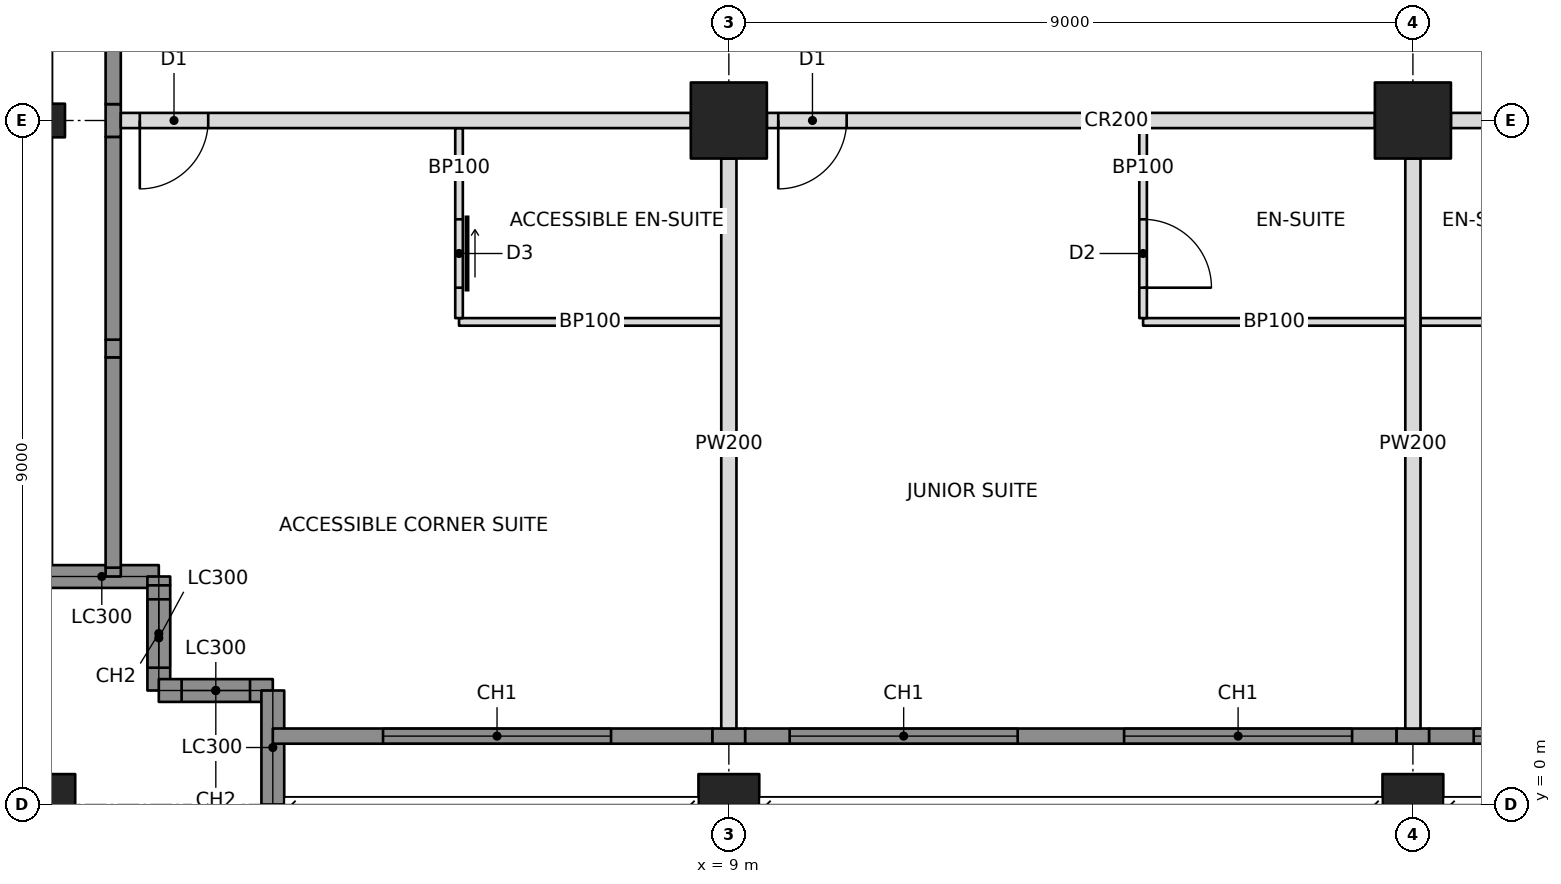
"""IFC4 building model, lengths in metres.
Left out: names, types, materials, properties, quantities, classifications, styles, units other than length and angle.
Written with IfcOpenShell. Run it as: python <this file> out.ifc"""

import sys

from ifc_helpers import new_model, si_unit, direction, frame, frame_2d, origin, origin_with_axes, origin_2d, place, context, subcontext, project, spatial, rectangle, hollow_rectangle, i_section, extrude, element, fill, save


model = new_model("IFC4")
c1 = context("Model", 3, precision=1e-05, world=origin(), true_north=direction((0.0, 1.0)))
c2 = subcontext(c1, "Body", "Model", "MODEL_VIEW")
j1 = project(units=[si_unit("LENGTHUNIT", "METRE"), si_unit("PLANEANGLEUNIT", "RADIAN")], contexts=[c1])
p1 = place(None, origin())
s1 = spatial("IfcSite", under=j1, at=p1, CompositionType="ELEMENT")
p2 = place(p1, origin())
s2 = spatial("IfcBuilding", under=s1, at=p2, CompositionType="ELEMENT")
p3 = place(p2, frame((0.0, 0.0, 152.0)))
s3 = spatial("IfcBuildingStorey", under=s2, at=p3, CompositionType="ELEMENT", Elevation=152.0)
p4 = place(p3, origin_with_axes())
e1 = element("IfcColumn", 1, at=p4, inside=s3, PredefinedType="COLUMN", context=c2, shape_type="SweptSolid", body=[
    extrude(hollow_rectangle(XDim=0.8, YDim=0.8, WallThickness=0.06, at=origin_2d()), origin(), (0.0, 0.0, 1.0), 3.4),
])
p5 = place(p3, frame((0.0, 9.0, 0.0), z_axis=(0.0, 0.0, 1.0), x_axis=(0.0, 1.0, 0.0)))
e2 = element("IfcColumn", 2, at=p5, inside=s3, PredefinedType="COLUMN", context=c2, shape_type="SweptSolid", body=[
    extrude(i_section(OverallWidth=0.442, OverallDepth=0.531, WebThickness=0.066, FlangeThickness=0.106, at=origin_2d()), origin(), (0.0, 0.0, 1.0), 3.4),
])
p6 = place(p3, frame((9.0, 0.0, 0.0), z_axis=(0.0, 0.0, 1.0), x_axis=(1.0, 0.0, 0.0)))
e3 = element("IfcColumn", 3, at=p6, inside=s3, PredefinedType="COLUMN", context=c2, shape_type="SweptSolid", body=[
    extrude(hollow_rectangle(XDim=0.8, YDim=0.8, WallThickness=0.06, at=origin_2d()), origin(), (0.0, 0.0, 1.0), 3.4),
])
p7 = place(p3, frame((9.0, 9.0, 0.0), z_axis=(0.0, 0.0, 1.0), x_axis=(1.0, 0.0, 0.0)))
e4 = element("IfcColumn", 4, at=p7, inside=s3, PredefinedType="COLUMN", context=c2, shape_type="SweptSolid", body=[
    extrude(hollow_rectangle(XDim=1.0, YDim=1.0, WallThickness=0.1, at=origin_2d()), origin(), (0.0, 0.0, 1.0), 3.4),
])
p8 = place(p3, frame((18.0, 0.0, 0.0), z_axis=(0.0, 0.0, 1.0), x_axis=(1.0, 0.0, 0.0)))
e5 = element("IfcColumn", 5, at=p8, inside=s3, PredefinedType="COLUMN", context=c2, shape_type="SweptSolid", body=[
    extrude(hollow_rectangle(XDim=0.8, YDim=0.8, WallThickness=0.06, at=origin_2d()), origin(), (0.0, 0.0, 1.0), 3.4),
])
p9 = place(p3, frame((18.0, 9.0, 0.0), z_axis=(0.0, 0.0, 1.0), x_axis=(1.0, 0.0, 0.0)))
e6 = element("IfcColumn", 6, at=p9, inside=s3, PredefinedType="COLUMN", context=c2, shape_type="SweptSolid", body=[
    extrude(hollow_rectangle(XDim=1.0, YDim=1.0, WallThickness=0.1, at=origin_2d()), origin(), (0.0, 0.0, 1.0), 3.4),
])
p10 = place(p3, frame((0.0, 3.0, 0.0), z_axis=(0.0, 0.0, 1.0), x_axis=(1.0, 0.0, 0.0)))
e7 = element("IfcWall", 7, at=p10, inside=s3, PredefinedType="SOLIDWALL", context=c2, shape_type="SweptSolid", body=[
    extrude(rectangle(XDim=1.5, YDim=0.3, at=frame_2d((0.75, 0.0))), origin(), (0.0, 0.0, 1.0), 2.202),
])
p11 = place(p3, frame((1.5, 3.0, 0.0), z_axis=(0.0, 0.0, 1.0), x_axis=(0.0, -1.0, 0.0)))
e8 = element("IfcWall", 8, at=p11, inside=s3, PredefinedType="SOLIDWALL", context=c2, shape_type="SweptSolid", body=[
    extrude(rectangle(XDim=0.116, YDim=0.3, at=frame_2d((0.058, 0.0))), origin(), (0.0, 0.0, 1.0), 2.542),
])
p12 = place(p3, frame((1.5, 1.5, 0.0), z_axis=(0.0, 0.0, 1.0), x_axis=(1.0, 0.0, 0.0)))
e9 = element("IfcWall", 9, at=p12, inside=s3, PredefinedType="SOLIDWALL", context=c2, shape_type="SweptSolid", body=[
    extrude(rectangle(XDim=1.5, YDim=0.3, at=frame_2d((0.75, 0.0))), origin(), (0.0, 0.0, 1.0), 3.15),
])
p13 = place(p12, frame((0.3, 0.0, 0.6)))
e10 = element("IfcOpeningElement", 10, at=p13, cuts=e9, PredefinedType="OPENING", context=c2, shape_type="SweptSolid", body=[
    extrude(rectangle(XDim=0.9, YDim=2.2, at=frame_2d((0.45, 1.1))), frame((0.0, 0.16, 0.0), z_axis=(0.0, -1.0, 0.0), x_axis=(1.0, 0.0, 0.0)), (0.0, 0.0, 1.0), 0.32),
])
p14 = place(p3, frame((3.0, 1.5, 0.0), z_axis=(0.0, 0.0, 1.0), x_axis=(0.0, -1.0, 0.0)))
e11 = element("IfcWall", 11, at=p14, inside=s3, PredefinedType="SOLIDWALL", context=c2, shape_type="SweptSolid", body=[
    extrude(rectangle(XDim=1.5, YDim=0.3, at=frame_2d((0.75, 0.0))), origin(), (0.0, 0.0, 1.0), 2.202),
])
p15 = place(p3, frame((3.0, 0.9, 0.0), z_axis=(0.0, 0.0, 1.0), x_axis=(1.0, 0.0, 0.0)))
e12 = element("IfcWall", 12, at=p15, inside=s3, PredefinedType="SOLIDWALL", context=c2, shape_type="SweptSolid", body=[
    extrude(rectangle(XDim=5.785, YDim=0.2, at=frame_2d((2.892, 0.0))), origin(), (0.0, 0.0, 1.0), 3.15),
])
p16 = place(p15, frame((1.45, 0.0, 0.6)))
e13 = element("IfcOpeningElement", 13, at=p16, cuts=e12, PredefinedType="OPENING", context=c2, shape_type="SweptSolid", body=[
    extrude(rectangle(XDim=3.0, YDim=2.2, at=frame_2d((1.5, 1.1))), frame((0.0, 0.11, 0.0), z_axis=(0.0, -1.0, 0.0), x_axis=(1.0, 0.0, 0.0)), (0.0, 0.0, 1.0), 0.22),
])
p17 = place(p3, frame((0.9, 3.0, 0.0), z_axis=(0.0, 0.0, 1.0), x_axis=(0.0, 1.0, 0.0)))
e14 = element("IfcWall", 14, at=p17, inside=s3, PredefinedType="SOLIDWALL", context=c2, shape_type="SweptSolid", body=[
    extrude(rectangle(XDim=0.116, YDim=0.2, at=frame_2d((0.058, 0.0))), origin(), (0.0, 0.0, 1.0), 2.542),
])
p18 = place(p3, frame((1.0, 9.0, 0.0), z_axis=(0.0, 0.0, 1.0), x_axis=(1.0, 0.0, 0.0)))
e15 = element("IfcWall", 15, at=p18, inside=s3, PredefinedType="PARTITIONING", context=c2, shape_type="SweptSolid", body=[
    extrude(rectangle(XDim=7.5, YDim=0.2, at=frame_2d((3.75, 0.0))), origin(), (0.0, 0.0, 1.0), 2.21),
])
p19 = place(p18, frame((0.25, 0.0, 0.0)))
e16 = element("IfcOpeningElement", 16, at=p19, cuts=e15, PredefinedType="OPENING", context=c2, shape_type="SweptSolid", body=[
    extrude(rectangle(XDim=0.9, YDim=2.1, at=frame_2d((0.45, 1.05))), frame((0.0, 0.11, 0.0), z_axis=(0.0, -1.0, 0.0), x_axis=(1.0, 0.0, 0.0)), (0.0, 0.0, 1.0), 0.22),
])
p20 = place(p3, frame((9.5, 9.0, 0.0), z_axis=(0.0, 0.0, 1.0), x_axis=(1.0, 0.0, 0.0)))
e17 = element("IfcWall", 17, at=p20, inside=s3, PredefinedType="PARTITIONING", context=c2, shape_type="SweptSolid", body=[
    extrude(rectangle(XDim=8.0, YDim=0.2, at=frame_2d((4.0, 0.0))), origin(), (0.0, 0.0, 1.0), 2.21),
])
p21 = place(p20, frame((0.15, 0.0, 0.0)))
e18 = element("IfcOpeningElement", 18, at=p21, cuts=e17, PredefinedType="OPENING", context=c2, shape_type="SweptSolid", body=[
    extrude(rectangle(XDim=0.9, YDim=2.1, at=frame_2d((0.45, 1.05))), frame((0.0, 0.11, 0.0), z_axis=(0.0, -1.0, 0.0), x_axis=(1.0, 0.0, 0.0)), (0.0, 0.0, 1.0), 0.22),
])
p22 = place(p3, frame((18.5, 9.0, 0.0), z_axis=(0.0, 0.0, 1.0), x_axis=(1.0, 0.0, 0.0)))
e19 = element("IfcWall", 19, at=p22, inside=s3, PredefinedType="PARTITIONING", context=c2, shape_type="SweptSolid", body=[
    extrude(rectangle(XDim=8.0, YDim=0.2, at=frame_2d((4.0, 0.0))), origin(), (0.0, 0.0, 1.0), 2.21),
])
p23 = place(p22, frame((2.85, 0.0, 0.0)))
e20 = element("IfcOpeningElement", 20, at=p23, cuts=e19, PredefinedType="OPENING", context=c2, shape_type="SweptSolid", body=[
    extrude(rectangle(XDim=0.9, YDim=2.1, at=frame_2d((0.45, 1.05))), frame((0.0, 0.11, 0.0), z_axis=(0.0, -1.0, 0.0), x_axis=(1.0, 0.0, 0.0)), (0.0, 0.0, 1.0), 0.22),
])
p24 = place(p22, frame((4.25, 0.0, 0.0)))
e21 = element("IfcOpeningElement", 21, at=p24, cuts=e19, PredefinedType="OPENING", context=c2, shape_type="SweptSolid", body=[
    extrude(rectangle(XDim=0.9, YDim=2.1, at=frame_2d((0.45, 1.05))), frame((0.0, 0.11, 0.0), z_axis=(0.0, -1.0, 0.0), x_axis=(1.0, 0.0, 0.0)), (0.0, 0.0, 1.0), 0.22),
])
p25 = place(p3, frame((9.0, 8.5, 0.0), z_axis=(0.0, 0.0, 1.0), x_axis=(0.0, -1.0, 0.0)))
e22 = element("IfcWall", 22, at=p25, inside=s3, PredefinedType="PARTITIONING", context=c2, shape_type="SweptSolid", body=[
    extrude(rectangle(XDim=7.5, YDim=0.2, at=frame_2d((3.75, 0.0))), origin(), (0.0, 0.0, 1.0), 2.21),
])
p26 = place(p3, frame((18.0, 8.5, 0.0), z_axis=(0.0, 0.0, 1.0), x_axis=(0.0, -1.0, 0.0)))
e23 = element("IfcWall", 23, at=p26, inside=s3, PredefinedType="PARTITIONING", context=c2, shape_type="SweptSolid", body=[
    extrude(rectangle(XDim=7.5, YDim=0.2, at=frame_2d((3.75, 0.0))), origin(), (0.0, 0.0, 1.0), 2.203),
])
p27 = place(p3, frame((5.45, 6.35, 0.0), z_axis=(0.0, 0.0, 1.0), x_axis=(1.0, 0.0, 0.0)))
e24 = element("IfcWall", 24, at=p27, inside=s3, PredefinedType="PARTITIONING", context=c2, shape_type="SweptSolid", body=[
    extrude(rectangle(XDim=3.45, YDim=0.1, at=frame_2d((1.725, 0.0))), origin(), (0.0, 0.0, 1.0), 2.21),
])
p28 = place(p3, frame((5.45, 8.9, 0.0), z_axis=(0.0, 0.0, 1.0), x_axis=(0.0, -1.0, 0.0)))
e25 = element("IfcWall", 25, at=p28, inside=s3, PredefinedType="PARTITIONING", context=c2, shape_type="SweptSolid", body=[
    extrude(rectangle(XDim=2.5, YDim=0.1, at=frame_2d((1.25, 0.0))), origin(), (0.0, 0.0, 1.0), 2.21),
])
p29 = place(p28, frame((1.2, 0.0, 0.0)))
e26 = element("IfcOpeningElement", 26, at=p29, cuts=e25, PredefinedType="OPENING", context=c2, shape_type="SweptSolid", body=[
    extrude(rectangle(XDim=0.9, YDim=2.1, at=frame_2d((0.45, 1.05))), frame((0.0, 0.06, 0.0), z_axis=(0.0, -1.0, 0.0), x_axis=(1.0, 0.0, 0.0)), (0.0, 0.0, 1.0), 0.12),
])
p30 = place(p3, frame((14.45, 6.35, 0.0), z_axis=(0.0, 0.0, 1.0), x_axis=(1.0, 0.0, 0.0)))
e27 = element("IfcWall", 27, at=p30, inside=s3, PredefinedType="PARTITIONING", context=c2, shape_type="SweptSolid", body=[
    extrude(rectangle(XDim=3.45, YDim=0.1, at=frame_2d((1.725, 0.0))), origin(), (0.0, 0.0, 1.0), 2.202),
])
p31 = place(p3, frame((14.45, 8.9, 0.0), z_axis=(0.0, 0.0, 1.0), x_axis=(0.0, -1.0, 0.0)))
e28 = element("IfcWall", 28, at=p31, inside=s3, PredefinedType="PARTITIONING", context=c2, shape_type="SweptSolid", body=[
    extrude(rectangle(XDim=2.5, YDim=0.1, at=frame_2d((1.25, 0.0))), origin(), (0.0, 0.0, 1.0), 2.21),
])
p32 = place(p31, frame((1.2, 0.0, 0.0)))
e29 = element("IfcOpeningElement", 29, at=p32, cuts=e28, PredefinedType="OPENING", context=c2, shape_type="SweptSolid", body=[
    extrude(rectangle(XDim=0.9, YDim=2.1, at=frame_2d((0.45, 1.05))), frame((0.0, 0.06, 0.0), z_axis=(0.0, -1.0, 0.0), x_axis=(1.0, 0.0, 0.0)), (0.0, 0.0, 1.0), 0.12),
])
p33 = place(p3, frame((18.1, 6.35, 0.0), z_axis=(0.0, 0.0, 1.0), x_axis=(1.0, 0.0, 0.0)))
e30 = element("IfcWall", 30, at=p33, inside=s3, PredefinedType="PARTITIONING", context=c2, shape_type="SweptSolid", body=[
    extrude(rectangle(XDim=2.95, YDim=0.1, at=frame_2d((1.475, 0.0))), origin(), (0.0, 0.0, 1.0), 2.202),
])
p34 = place(p3, frame((1.5, 2.884, 0.0), z_axis=(0.0, 0.0, 1.0), x_axis=(0.0, -1.0, 0.0)))
e31 = element("IfcWall", 31, at=p34, inside=s3, PredefinedType="SOLIDWALL", context=c2, shape_type="SweptSolid", body=[
    extrude(rectangle(XDim=1.384, YDim=0.3, at=frame_2d((0.692, 0.0))), origin(), (0.0, 0.0, 1.0), 3.15),
])
p35 = place(p34, frame((0.184, 0.0, 0.6)))
e32 = element("IfcOpeningElement", 32, at=p35, cuts=e31, PredefinedType="OPENING", context=c2, shape_type="SweptSolid", body=[
    extrude(rectangle(XDim=0.9, YDim=2.2, at=frame_2d((0.45, 1.1))), frame((0.0, 0.16, 0.0), z_axis=(0.0, -1.0, 0.0), x_axis=(1.0, 0.0, 0.0)), (0.0, 0.0, 1.0), 0.32),
])
p36 = place(p3, frame((8.785, 0.9, 0.0), z_axis=(0.0, 0.0, 1.0), x_axis=(1.0, 0.0, 0.0)))
e33 = element("IfcWall", 33, at=p36, inside=s3, PredefinedType="SOLIDWALL", context=c2, shape_type="SweptSolid", body=[
    extrude(rectangle(XDim=0.431, YDim=0.2, at=frame_2d((0.215, 0.0))), origin(), (0.0, 0.0, 1.0), 2.21),
])
p37 = place(p3, frame((9.215, 0.9, 0.0), z_axis=(0.0, 0.0, 1.0), x_axis=(1.0, 0.0, 0.0)))
e34 = element("IfcWall", 34, at=p37, inside=s3, PredefinedType="SOLIDWALL", context=c2, shape_type="SweptSolid", body=[
    extrude(rectangle(XDim=8.571, YDim=0.2, at=frame_2d((4.285, 0.0))), origin(), (0.0, 0.0, 1.0), 3.15),
])
p38 = place(p37, frame((0.585, 0.0, 0.6)))
e35 = element("IfcOpeningElement", 35, at=p38, cuts=e34, PredefinedType="OPENING", context=c2, shape_type="SweptSolid", body=[
    extrude(rectangle(XDim=3.0, YDim=2.2, at=frame_2d((1.5, 1.1))), frame((0.0, 0.11, 0.0), z_axis=(0.0, -1.0, 0.0), x_axis=(1.0, 0.0, 0.0)), (0.0, 0.0, 1.0), 0.22),
])
p39 = place(p37, frame((4.985, 0.0, 0.6)))
e36 = element("IfcOpeningElement", 36, at=p39, cuts=e34, PredefinedType="OPENING", context=c2, shape_type="SweptSolid", body=[
    extrude(rectangle(XDim=3.0, YDim=2.2, at=frame_2d((1.5, 1.1))), frame((0.0, 0.11, 0.0), z_axis=(0.0, -1.0, 0.0), x_axis=(1.0, 0.0, 0.0)), (0.0, 0.0, 1.0), 0.22),
])
p40 = place(p3, frame((17.786, 0.9, 0.0), z_axis=(0.0, 0.0, 1.0), x_axis=(1.0, 0.0, 0.0)))
e37 = element("IfcWall", 37, at=p40, inside=s3, PredefinedType="SOLIDWALL", context=c2, shape_type="SweptSolid", body=[
    extrude(rectangle(XDim=0.428, YDim=0.2, at=frame_2d((0.214, 0.0))), origin(), (0.0, 0.0, 1.0), 2.202),
])
p41 = place(p3, frame((18.214, 0.9, 0.0), z_axis=(0.0, 0.0, 1.0), x_axis=(1.0, 0.0, 0.0)))
e38 = element("IfcWall", 38, at=p41, inside=s3, PredefinedType="SOLIDWALL", context=c2, shape_type="SweptSolid", body=[
    extrude(rectangle(XDim=8.572, YDim=0.2, at=frame_2d((4.286, 0.0))), origin(), (0.0, 0.0, 1.0), 3.15),
])
p42 = place(p41, frame((0.586, 0.0, 0.6)))
e39 = element("IfcOpeningElement", 39, at=p42, cuts=e38, PredefinedType="OPENING", context=c2, shape_type="SweptSolid", body=[
    extrude(rectangle(XDim=3.0, YDim=2.2, at=frame_2d((1.5, 1.1))), frame((0.0, 0.11, 0.0), z_axis=(0.0, -1.0, 0.0), x_axis=(1.0, 0.0, 0.0)), (0.0, 0.0, 1.0), 0.22),
])
p43 = place(p41, frame((4.986, 0.0, 0.6)))
e40 = element("IfcOpeningElement", 40, at=p43, cuts=e38, PredefinedType="OPENING", context=c2, shape_type="SweptSolid", body=[
    extrude(rectangle(XDim=3.0, YDim=2.2, at=frame_2d((1.5, 1.1))), frame((0.0, 0.11, 0.0), z_axis=(0.0, -1.0, 0.0), x_axis=(1.0, 0.0, 0.0)), (0.0, 0.0, 1.0), 0.22),
])
p44 = place(p3, frame((0.9, 3.116, 0.0), z_axis=(0.0, 0.0, 1.0), x_axis=(0.0, 1.0, 0.0)))
e41 = element("IfcWall", 41, at=p44, inside=s3, PredefinedType="SOLIDWALL", context=c2, shape_type="SweptSolid", body=[
    extrude(rectangle(XDim=2.768, YDim=0.2, at=frame_2d((1.384, 0.0))), origin(), (0.0, 0.0, 1.0), 3.15),
])
p45 = place(p3, frame((0.9, 5.884, 0.0), z_axis=(0.0, 0.0, 1.0), x_axis=(0.0, 1.0, 0.0)))
e42 = element("IfcWall", 42, at=p45, inside=s3, PredefinedType="SOLIDWALL", context=c2, shape_type="SweptSolid", body=[
    extrude(rectangle(XDim=0.232, YDim=0.2, at=frame_2d((0.116, 0.0))), origin(), (0.0, 0.0, 1.0), 2.542),
])
p46 = place(p3, frame((0.9, 6.116, 0.0), z_axis=(0.0, 0.0, 1.0), x_axis=(0.0, 1.0, 0.0)))
e43 = element("IfcWall", 43, at=p46, inside=s3, PredefinedType="SOLIDWALL", context=c2, shape_type="SweptSolid", body=[
    extrude(rectangle(XDim=2.668, YDim=0.2, at=frame_2d((1.334, 0.0))), origin(), (0.0, 0.0, 1.0), 3.15),
])
p47 = place(p3, frame((0.9, 8.785, 0.0), z_axis=(0.0, 0.0, 1.0), x_axis=(0.0, 1.0, 0.0)))
e44 = element("IfcWall", 44, at=p47, inside=s3, PredefinedType="SOLIDWALL", context=c2, shape_type="SweptSolid", body=[
    extrude(rectangle(XDim=0.431, YDim=0.2, at=frame_2d((0.215, 0.0))), origin(), (0.0, 0.0, 1.0), 2.21),
])
p48 = place(p3, frame((0.9, 9.215, 0.0), z_axis=(0.0, 0.0, 1.0), x_axis=(0.0, 1.0, 0.0)))
e45 = element("IfcWall", 45, at=p48, inside=s3, PredefinedType="SOLIDWALL", context=c2, shape_type="SweptSolid", body=[
    extrude(rectangle(XDim=8.571, YDim=0.2, at=frame_2d((4.285, 0.0))), origin(), (0.0, 0.0, 1.0), 3.15),
])
p49 = place(p48, frame((1.935, 0.0, 0.6)))
e46 = element("IfcOpeningElement", 46, at=p49, cuts=e45, PredefinedType="OPENING", context=c2, shape_type="SweptSolid", body=[
    extrude(rectangle(XDim=3.0, YDim=2.2, at=frame_2d((1.5, 1.1))), frame((0.0, 0.11, 0.0), z_axis=(0.0, -1.0, 0.0), x_axis=(1.0, 0.0, 0.0)), (0.0, 0.0, 1.0), 0.22),
])
p50 = place(p48, frame((5.435, 0.0, 0.6)))
e47 = element("IfcOpeningElement", 47, at=p50, cuts=e45, PredefinedType="OPENING", context=c2, shape_type="SweptSolid", body=[
    extrude(rectangle(XDim=3.0, YDim=2.2, at=frame_2d((1.5, 1.1))), frame((0.0, 0.11, 0.0), z_axis=(0.0, -1.0, 0.0), x_axis=(1.0, 0.0, 0.0)), (0.0, 0.0, 1.0), 0.22),
])
p51 = place(p35, origin())
e48 = element("IfcWindow", 48, at=p51, inside=s3, PartitioningType="SINGLE_PANEL", PredefinedType="WINDOW", context=c2, shape_type="SweptSolid", body=[
    extrude(rectangle(XDim=0.9, YDim=2.2, at=frame_2d((0.45, 1.1))), frame((0.0, 0.03, 0.0), z_axis=(0.0, -1.0, 0.0), x_axis=(1.0, 0.0, 0.0)), (0.0, 0.0, 1.0), 0.06),
])
fill(e32, e48)
p52 = place(p13, origin())
e49 = element("IfcWindow", 49, at=p52, inside=s3, PartitioningType="SINGLE_PANEL", PredefinedType="WINDOW", context=c2, shape_type="SweptSolid", body=[
    extrude(rectangle(XDim=0.9, YDim=2.2, at=frame_2d((0.45, 1.1))), frame((0.0, 0.03, 0.0), z_axis=(0.0, -1.0, 0.0), x_axis=(1.0, 0.0, 0.0)), (0.0, 0.0, 1.0), 0.06),
])
fill(e10, e49)
p53 = place(p16, origin())
e50 = element("IfcWindow", 50, at=p53, inside=s3, PartitioningType="TRIPLE_PANEL_VERTICAL", PredefinedType="WINDOW", context=c2, shape_type="SweptSolid", body=[
    extrude(rectangle(XDim=3.0, YDim=2.2, at=frame_2d((1.5, 1.1))), frame((0.0, 0.03, 0.0), z_axis=(0.0, -1.0, 0.0), x_axis=(1.0, 0.0, 0.0)), (0.0, 0.0, 1.0), 0.06),
])
fill(e13, e50)
p54 = place(p38, origin())
e51 = element("IfcWindow", 51, at=p54, inside=s3, PartitioningType="TRIPLE_PANEL_VERTICAL", PredefinedType="WINDOW", context=c2, shape_type="SweptSolid", body=[
    extrude(rectangle(XDim=3.0, YDim=2.2, at=frame_2d((1.5, 1.1))), frame((0.0, 0.03, 0.0), z_axis=(0.0, -1.0, 0.0), x_axis=(1.0, 0.0, 0.0)), (0.0, 0.0, 1.0), 0.06),
])
fill(e35, e51)
p55 = place(p39, origin())
e52 = element("IfcWindow", 52, at=p55, inside=s3, PartitioningType="TRIPLE_PANEL_VERTICAL", PredefinedType="WINDOW", context=c2, shape_type="SweptSolid", body=[
    extrude(rectangle(XDim=3.0, YDim=2.2, at=frame_2d((1.5, 1.1))), frame((0.0, 0.03, 0.0), z_axis=(0.0, -1.0, 0.0), x_axis=(1.0, 0.0, 0.0)), (0.0, 0.0, 1.0), 0.06),
])
fill(e36, e52)
p56 = place(p42, origin())
e53 = element("IfcWindow", 53, at=p56, inside=s3, PartitioningType="TRIPLE_PANEL_VERTICAL", PredefinedType="WINDOW", context=c2, shape_type="SweptSolid", body=[
    extrude(rectangle(XDim=3.0, YDim=2.2, at=frame_2d((1.5, 1.1))), frame((0.0, 0.03, 0.0), z_axis=(0.0, -1.0, 0.0), x_axis=(1.0, 0.0, 0.0)), (0.0, 0.0, 1.0), 0.06),
])
fill(e39, e53)
p57 = place(p29, origin())
e54 = element("IfcDoor", 54, at=p57, inside=s3, OperationType="SLIDING_TO_LEFT", PredefinedType="DOOR", context=c2, shape_type="SweptSolid", body=[
    extrude(rectangle(XDim=0.9, YDim=2.1, at=frame_2d((0.45, 1.05))), frame((0.0, 0.025, 0.0), z_axis=(0.0, -1.0, 0.0), x_axis=(1.0, 0.0, 0.0)), (0.0, 0.0, 1.0), 0.05),
])
fill(e26, e54)
p58 = place(p19, frame((0.9, 0.0, 0.0), z_axis=(0.0, 0.0, 1.0), x_axis=(-1.0, 0.0, 0.0)))
e55 = element("IfcDoor", 55, at=p58, inside=s3, OperationType="SINGLE_SWING_RIGHT", PredefinedType="DOOR", context=c2, shape_type="SweptSolid", body=[
    extrude(rectangle(XDim=0.9, YDim=2.1, at=frame_2d((0.45, 1.05))), frame((0.0, 0.025, 0.0), z_axis=(0.0, -1.0, 0.0), x_axis=(1.0, 0.0, 0.0)), (0.0, 0.0, 1.0), 0.05),
])
fill(e16, e55)
p59 = place(p32, origin())
e56 = element("IfcDoor", 56, at=p59, inside=s3, OperationType="SINGLE_SWING_RIGHT", PredefinedType="DOOR", context=c2, shape_type="SweptSolid", body=[
    extrude(rectangle(XDim=0.9, YDim=2.1, at=frame_2d((0.45, 1.05))), frame((0.0, 0.025, 0.0), z_axis=(0.0, -1.0, 0.0), x_axis=(1.0, 0.0, 0.0)), (0.0, 0.0, 1.0), 0.05),
])
fill(e29, e56)
p60 = place(p21, frame((0.9, 0.0, 0.0), z_axis=(0.0, 0.0, 1.0), x_axis=(-1.0, 0.0, 0.0)))
e57 = element("IfcDoor", 57, at=p60, inside=s3, OperationType="SINGLE_SWING_RIGHT", PredefinedType="DOOR", context=c2, shape_type="SweptSolid", body=[
    extrude(rectangle(XDim=0.9, YDim=2.1, at=frame_2d((0.45, 1.05))), frame((0.0, 0.025, 0.0), z_axis=(0.0, -1.0, 0.0), x_axis=(1.0, 0.0, 0.0)), (0.0, 0.0, 1.0), 0.05),
])
fill(e18, e57)
save(model, sys.argv[1])
